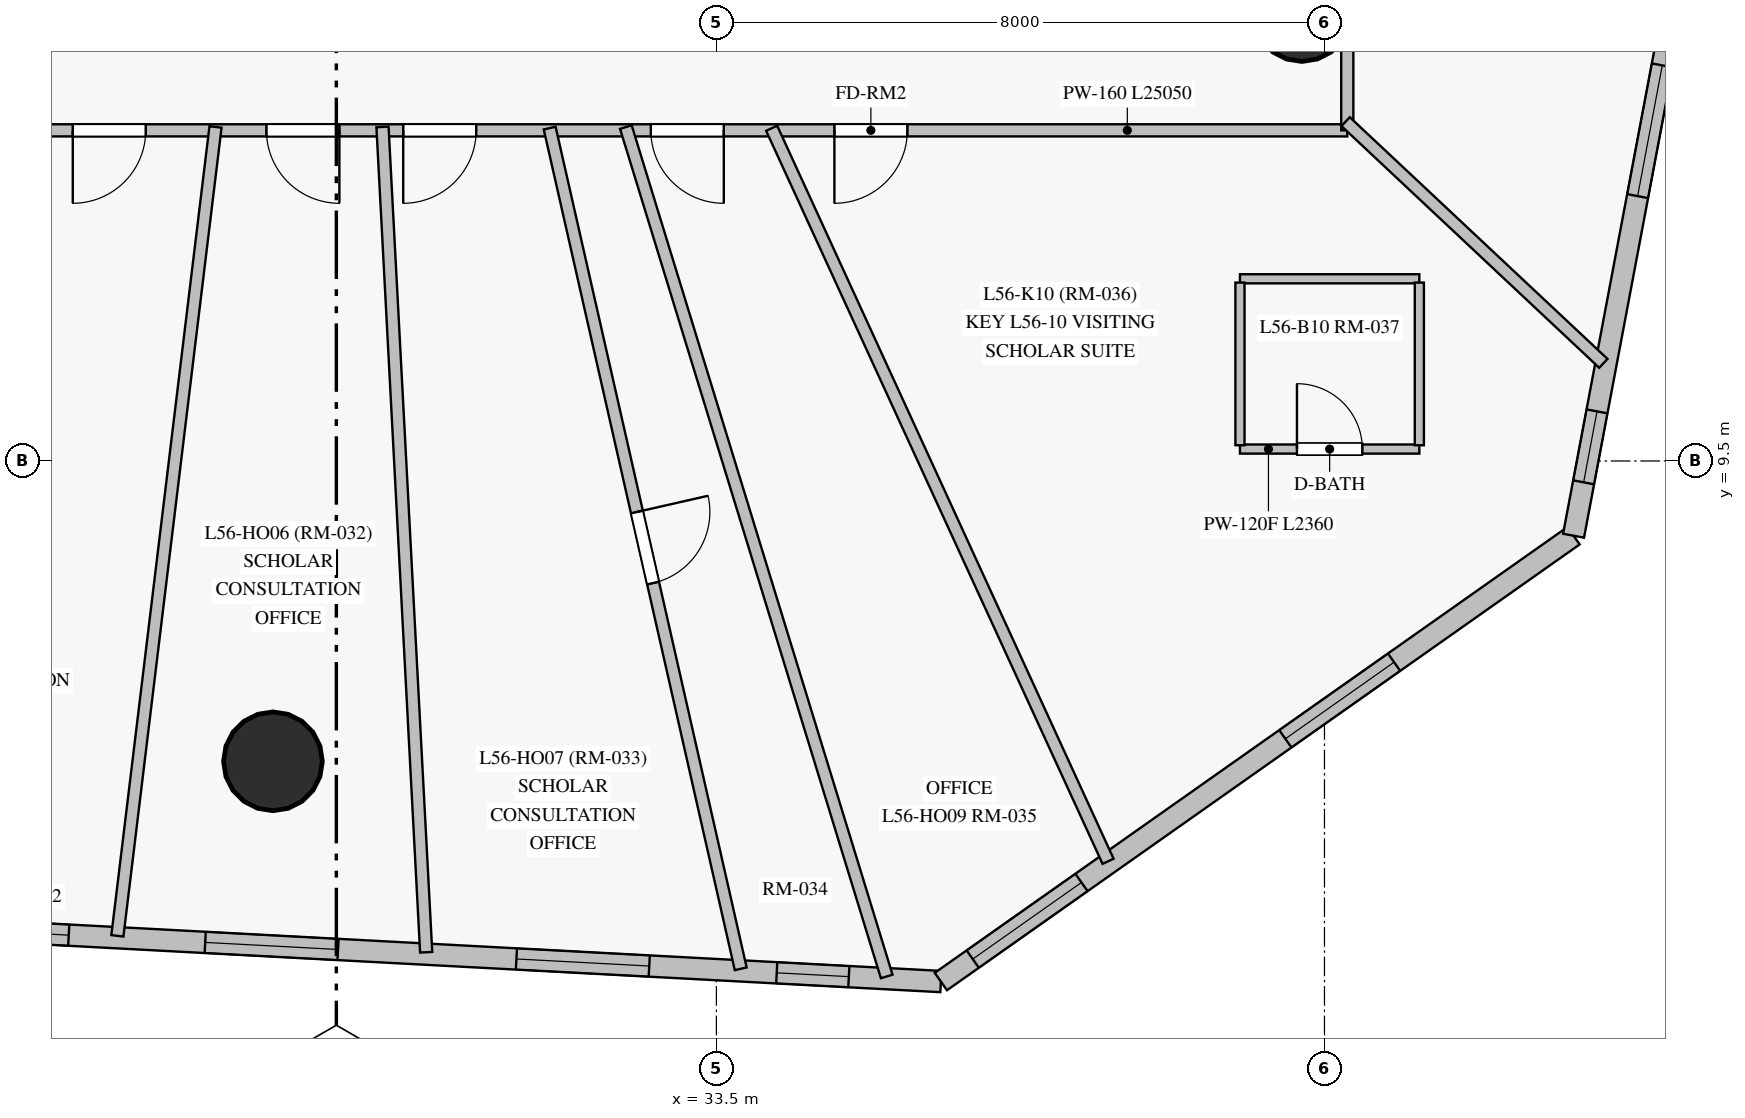
"""IFC4 building model, lengths in metres.
Left out: names, types, materials, properties, quantities, classifications, styles, units other than length and angle.
Written with IfcOpenShell. Run it as: python <this file> out.ifc"""

import sys

from ifc_helpers import new_model, si_unit, direction, frame, frame_2d, origin, origin_with_axes, origin_2d, place, context, subcontext, project, spatial, rectangle, circle, extrude, source, transform, mapped, element, fill, save


model = new_model("IFC4")
c1 = context("Model", 3, precision=1e-05, world=origin(), true_north=direction((0.0, 1.0)))
c2 = subcontext(c1, "Body", "Model", "MODEL_VIEW")
j1 = project(units=[si_unit("LENGTHUNIT", "METRE"), si_unit("PLANEANGLEUNIT", "RADIAN")], contexts=[c1])
p1 = place(None, origin())
s1 = spatial("IfcSite", under=j1, at=p1, CompositionType="ELEMENT")
p2 = place(p1, origin())
s2 = spatial("IfcBuilding", under=s1, at=p2, CompositionType="ELEMENT")
p3 = place(p2, frame((0.0, 0.0, 193.15)))
s3 = spatial("IfcBuildingStorey", under=s2, at=p3, CompositionType="ELEMENT", Elevation=193.15)
m1 = source(origin_with_axes(), c2, "Body", "SweptSolid", [
    extrude(circle(Radius=0.65, at=origin_2d()), origin(), (0.0, 0.0, 1.0), 3.05),
])
for number, where, z_axis, x_axis in (
    (1, (27.666, 5.549, 0.0), (0.0, 0.0, 1.0), (1.0, 0.0, 0.0)),
    (2, (41.204, 15.406, 0.0), (0.0, 0.0, 1.0), (1.0, 0.0, 0.0)),
):
    element("IfcColumn", number, at=place(p3, frame(where, z_axis=z_axis, x_axis=x_axis)), inside=s3, PredefinedType="COLUMN", context=c2, shape_type="MappedRepresentation", body=[
        mapped(m1, transform((0.0, 0.0, 0.0), scale=1.0)),
    ])
p4 = place(p3, frame((23.33, 3.35, 0.0), z_axis=(0.0, 0.0, 1.0), x_axis=(0.998588579162, -0.053111670719, 0.0)))
e3 = element("IfcWall", 3, at=p4, inside=s3, PredefinedType="SOLIDWALL", context=c2, shape_type="SweptSolid", body=[
    extrude(rectangle(XDim=13.142, YDim=0.28, at=frame_2d((6.571, 0.0))), origin(), (0.0, 0.0, 1.0), 2.825),
])
p5 = place(p4, frame((0.702, 0.0, 0.85)))
e4 = element("IfcOpeningElement", 4, at=p5, cuts=e3, PredefinedType="OPENING", context=c2, shape_type="SweptSolid", body=[
    extrude(rectangle(XDim=0.95, YDim=1.5, at=frame_2d((0.475, 0.75))), frame((0.0, 0.15, 0.0), z_axis=(0.0, -1.0, 0.0), x_axis=(1.0, 0.0, 0.0)), (0.0, 0.0, 1.0), 0.3),
])
p6 = place(p4, frame((3.45, 0.0, 0.85)))
e5 = element("IfcOpeningElement", 5, at=p6, cuts=e3, PredefinedType="OPENING", context=c2, shape_type="SweptSolid", body=[
    extrude(rectangle(XDim=1.75, YDim=1.65, at=frame_2d((0.875, 0.825))), frame((0.0, 0.15, 0.0), z_axis=(0.0, -1.0, 0.0), x_axis=(1.0, 0.0, 0.0)), (0.0, 0.0, 1.0), 0.3),
])
p7 = place(p4, frame((7.55, 0.0, 0.85)))
e6 = element("IfcOpeningElement", 6, at=p7, cuts=e3, PredefinedType="OPENING", context=c2, shape_type="SweptSolid", body=[
    extrude(rectangle(XDim=1.75, YDim=1.65, at=frame_2d((0.875, 0.825))), frame((0.0, 0.15, 0.0), z_axis=(0.0, -1.0, 0.0), x_axis=(1.0, 0.0, 0.0)), (0.0, 0.0, 1.0), 0.3),
])
p8 = place(p4, frame((10.979, 0.0, 0.85)))
e7 = element("IfcOpeningElement", 7, at=p8, cuts=e3, PredefinedType="OPENING", context=c2, shape_type="SweptSolid", body=[
    extrude(rectangle(XDim=0.95, YDim=1.5, at=frame_2d((0.475, 0.75))), frame((0.0, 0.15, 0.0), z_axis=(0.0, -1.0, 0.0), x_axis=(1.0, 0.0, 0.0)), (0.0, 0.0, 1.0), 0.3),
])
p9 = place(p3, frame((36.453, 2.652, 0.0), z_axis=(0.0, 0.0, 1.0), x_axis=(0.817449334026, 0.576000508941, 0.0)))
e8 = element("IfcWall", 8, at=p9, inside=s3, PredefinedType="SOLIDWALL", context=c2, shape_type="SweptSolid", body=[
    extrude(rectangle(XDim=10.182, YDim=0.28, at=frame_2d((5.091, 0.0))), origin(), (0.0, 0.0, 1.0), 2.825),
])
p10 = place(p9, frame((0.513, 0.0, 0.85)))
e9 = element("IfcOpeningElement", 9, at=p10, cuts=e8, PredefinedType="OPENING", context=c2, shape_type="SweptSolid", body=[
    extrude(rectangle(XDim=1.75, YDim=1.65, at=frame_2d((0.875, 0.825))), frame((0.0, 0.15, 0.0), z_axis=(0.0, -1.0, 0.0), x_axis=(1.0, 0.0, 0.0)), (0.0, 0.0, 1.0), 0.3),
])
p11 = place(p9, frame((5.544, 0.0, 0.85)))
e10 = element("IfcOpeningElement", 10, at=p11, cuts=e8, PredefinedType="OPENING", context=c2, shape_type="SweptSolid", body=[
    extrude(rectangle(XDim=1.75, YDim=1.65, at=frame_2d((0.875, 0.825))), frame((0.0, 0.15, 0.0), z_axis=(0.0, -1.0, 0.0), x_axis=(1.0, 0.0, 0.0)), (0.0, 0.0, 1.0), 0.3),
])
p12 = place(p3, frame((44.777, 8.517, 0.0), z_axis=(0.0, 0.0, 1.0), x_axis=(0.185389024618, 0.982665207256, 0.0)))
e11 = element("IfcWall", 11, at=p12, inside=s3, PredefinedType="SOLIDWALL", context=c2, shape_type="SweptSolid", body=[
    extrude(rectangle(XDim=14.17, YDim=0.28, at=frame_2d((7.085, 0.0))), origin(), (0.0, 0.0, 1.0), 2.825),
])
p13 = place(p12, frame((0.715, 0.0, 0.85)))
e12 = element("IfcOpeningElement", 12, at=p13, cuts=e11, PredefinedType="OPENING", context=c2, shape_type="SweptSolid", body=[
    extrude(rectangle(XDim=0.95, YDim=1.5, at=frame_2d((0.475, 0.75))), frame((0.0, 0.15, 0.0), z_axis=(0.0, -1.0, 0.0), x_axis=(1.0, 0.0, 0.0)), (0.0, 0.0, 1.0), 0.3),
])
p14 = place(p12, frame((4.547, 0.0, 0.85)))
e13 = element("IfcOpeningElement", 13, at=p14, cuts=e11, PredefinedType="OPENING", context=c2, shape_type="SweptSolid", body=[
    extrude(rectangle(XDim=1.75, YDim=1.65, at=frame_2d((0.875, 0.825))), frame((0.0, 0.15, 0.0), z_axis=(0.0, -1.0, 0.0), x_axis=(1.0, 0.0, 0.0)), (0.0, 0.0, 1.0), 0.3),
])
p15 = place(p12, frame((10.442, 0.0, 0.85)))
e14 = element("IfcOpeningElement", 14, at=p15, cuts=e11, PredefinedType="OPENING", context=c2, shape_type="SweptSolid", body=[
    extrude(rectangle(XDim=1.75, YDim=1.65, at=frame_2d((0.875, 0.825))), frame((0.0, 0.15, 0.0), z_axis=(0.0, -1.0, 0.0), x_axis=(1.0, 0.0, 0.0)), (0.0, 0.0, 1.0), 0.3),
])
p16 = place(p3, frame((41.8, 13.85, 0.0), z_axis=(0.0, 0.0, 1.0), x_axis=(-1.0, 0.0, 0.0)))
e15 = element("IfcWall", 15, at=p16, inside=s3, PredefinedType="PARTITIONING", context=c2, shape_type="SweptSolid", body=[
    extrude(rectangle(XDim=25.05, YDim=0.16, at=frame_2d((12.525, 0.0))), origin(), (0.0, 0.0, 1.0), 2.275),
])
p17 = place(p16, frame((5.788, 0.0, 0.0)))
e16 = element("IfcOpeningElement", 16, at=p17, cuts=e15, PredefinedType="OPENING", context=c2, shape_type="SweptSolid", body=[
    extrude(rectangle(XDim=0.96, YDim=2.15, at=frame_2d((0.48, 1.075))), frame((0.0, 0.09, 0.0), z_axis=(0.0, -1.0, 0.0), x_axis=(1.0, 0.0, 0.0)), (0.0, 0.0, 1.0), 0.18),
])
p18 = place(p16, frame((18.802, 0.0, 0.0)))
e17 = element("IfcOpeningElement", 17, at=p18, cuts=e15, PredefinedType="OPENING", context=c2, shape_type="SweptSolid", body=[
    extrude(rectangle(XDim=0.96, YDim=2.15, at=frame_2d((0.48, 1.075))), frame((0.0, 0.09, 0.0), z_axis=(0.0, -1.0, 0.0), x_axis=(1.0, 0.0, 0.0)), (0.0, 0.0, 1.0), 0.18),
])
p19 = place(p16, frame((15.808, 0.0, 0.0)))
e18 = element("IfcOpeningElement", 18, at=p19, cuts=e15, PredefinedType="OPENING", context=c2, shape_type="SweptSolid", body=[
    extrude(rectangle(XDim=0.96, YDim=2.15, at=frame_2d((0.48, 1.075))), frame((0.0, 0.09, 0.0), z_axis=(0.0, -1.0, 0.0), x_axis=(1.0, 0.0, 0.0)), (0.0, 0.0, 1.0), 0.18),
])
p20 = place(p16, frame((13.26, 0.0, 0.0)))
e19 = element("IfcOpeningElement", 19, at=p20, cuts=e15, PredefinedType="OPENING", context=c2, shape_type="SweptSolid", body=[
    extrude(rectangle(XDim=0.96, YDim=2.15, at=frame_2d((0.48, 1.075))), frame((0.0, 0.09, 0.0), z_axis=(0.0, -1.0, 0.0), x_axis=(1.0, 0.0, 0.0)), (0.0, 0.0, 1.0), 0.18),
])
p21 = place(p16, frame((11.46, 0.0, 0.0)))
e20 = element("IfcOpeningElement", 20, at=p21, cuts=e15, PredefinedType="OPENING", context=c2, shape_type="SweptSolid", body=[
    extrude(rectangle(XDim=0.96, YDim=2.15, at=frame_2d((0.48, 1.075))), frame((0.0, 0.09, 0.0), z_axis=(0.0, -1.0, 0.0), x_axis=(1.0, 0.0, 0.0)), (0.0, 0.0, 1.0), 0.18),
])
p22 = place(p16, frame((8.202, 0.0, 0.0)))
e21 = element("IfcOpeningElement", 21, at=p22, cuts=e15, PredefinedType="OPENING", context=c2, shape_type="SweptSolid", body=[
    extrude(rectangle(XDim=0.96, YDim=2.15, at=frame_2d((0.48, 1.075))), frame((0.0, 0.09, 0.0), z_axis=(0.0, -1.0, 0.0), x_axis=(1.0, 0.0, 0.0)), (0.0, 0.0, 1.0), 0.18),
])
p23 = place(p3, frame((41.8, 33.45, 0.0), z_axis=(0.0, 0.0, 1.0), x_axis=(0.0, -1.0, 0.0)))
e22 = element("IfcWall", 22, at=p23, inside=s3, PredefinedType="PARTITIONING", context=c2, shape_type="SweptSolid", body=[
    extrude(rectangle(XDim=19.6, YDim=0.16, at=frame_2d((9.8, 0.0))), origin(), (0.0, 0.0, 1.0), 2.275),
])
p24 = place(p23, frame((14.715, 0.0, 0.0)))
e23 = element("IfcOpeningElement", 23, at=p24, cuts=e22, PredefinedType="OPENING", context=c2, shape_type="SweptSolid", body=[
    extrude(rectangle(XDim=0.96, YDim=2.15, at=frame_2d((0.48, 1.075))), frame((0.0, 0.09, 0.0), z_axis=(0.0, -1.0, 0.0), x_axis=(1.0, 0.0, 0.0)), (0.0, 0.0, 1.0), 0.18),
])
p25 = place(p23, frame((9.325, 0.0, 0.0)))
e24 = element("IfcOpeningElement", 24, at=p25, cuts=e22, PredefinedType="OPENING", context=c2, shape_type="SweptSolid", body=[
    extrude(rectangle(XDim=0.96, YDim=2.15, at=frame_2d((0.48, 1.075))), frame((0.0, 0.09, 0.0), z_axis=(0.0, -1.0, 0.0), x_axis=(1.0, 0.0, 0.0)), (0.0, 0.0, 1.0), 0.18),
])
p26 = place(p23, frame((4.425, 0.0, 0.0)))
e25 = element("IfcOpeningElement", 25, at=p26, cuts=e22, PredefinedType="OPENING", context=c2, shape_type="SweptSolid", body=[
    extrude(rectangle(XDim=0.96, YDim=2.15, at=frame_2d((0.48, 1.075))), frame((0.0, 0.09, 0.0), z_axis=(0.0, -1.0, 0.0), x_axis=(1.0, 0.0, 0.0)), (0.0, 0.0, 1.0), 0.18),
])
p27 = place(p3, frame((32.309, 13.893, 0.0), z_axis=(0.0, 0.0, 1.0), x_axis=(0.293563334505, -0.95593962604, 0.0)))
e26 = element("IfcWall", 26, at=p27, inside=s3, PredefinedType="PARTITIONING", context=c2, shape_type="SweptSolid", body=[
    extrude(rectangle(XDim=11.69, YDim=0.16, at=frame_2d((5.845, 0.0))), origin(), (0.0, 0.0, 1.0), 2.825),
])
p28 = place(p3, frame((31.307, 13.879, 0.0), z_axis=(0.0, 0.0, 1.0), x_axis=(0.221597844898, -0.975138141566, 0.0)))
e27 = element("IfcWall", 27, at=p28, inside=s3, PredefinedType="PARTITIONING", context=c2, shape_type="SweptSolid", body=[
    extrude(rectangle(XDim=11.342, YDim=0.16, at=frame_2d((5.671, 0.0))), origin(), (0.0, 0.0, 1.0), 2.825),
])
p29 = place(p28, frame((5.179, 0.0, 0.0)))
e28 = element("IfcOpeningElement", 28, at=p29, cuts=e27, PredefinedType="OPENING", context=c2, shape_type="SweptSolid", body=[
    extrude(rectangle(XDim=0.96, YDim=2.15, at=frame_2d((0.48, 1.075))), frame((0.0, 0.09, 0.0), z_axis=(0.0, -1.0, 0.0), x_axis=(1.0, 0.0, 0.0)), (0.0, 0.0, 1.0), 0.18),
])
p30 = place(p3, frame((29.107, 13.895, 0.0), z_axis=(0.0, 0.0, 1.0), x_axis=(0.052855813996, -0.998602154477, 0.0)))
e29 = element("IfcWall", 29, at=p30, inside=s3, PredefinedType="PARTITIONING", context=c2, shape_type="SweptSolid", body=[
    extrude(rectangle(XDim=10.873, YDim=0.16, at=frame_2d((5.437, 0.0))), origin(), (0.0, 0.0, 1.0), 2.825),
])
p31 = place(p3, frame((26.91, 13.895, 0.0), z_axis=(0.0, 0.0, 1.0), x_axis=(-0.120454472702, -0.992718852448, 0.0)))
e30 = element("IfcWall", 30, at=p31, inside=s3, PredefinedType="PARTITIONING", context=c2, shape_type="SweptSolid", body=[
    extrude(rectangle(XDim=10.72, YDim=0.16, at=frame_2d((5.36, 0.0))), origin(), (0.0, 0.0, 1.0), 2.275),
])
p32 = place(p3, frame((34.227, 13.877, 0.0), z_axis=(0.0, 0.0, 1.0), x_axis=(0.417118124117, -0.90885228202, 0.0)))
e31 = element("IfcWall", 31, at=p32, inside=s3, PredefinedType="PARTITIONING", context=c2, shape_type="SweptSolid", body=[
    extrude(rectangle(XDim=10.611, YDim=0.16, at=frame_2d((5.306, 0.0))), origin(), (0.0, 0.0, 1.0), 2.825),
])
p33 = place(p3, frame((41.778, 13.965, 0.0), z_axis=(0.0, 0.0, 1.0), x_axis=(0.729404533872, -0.684082616331, 0.0)))
e32 = element("IfcWall", 32, at=p33, inside=s3, PredefinedType="PARTITIONING", context=c2, shape_type="SweptSolid", body=[
    extrude(rectangle(XDim=4.649, YDim=0.16, at=frame_2d((2.324, 0.0))), origin(), (0.0, 0.0, 1.0), 2.825),
])
p34 = place(p3, frame((40.388, 9.657, 0.0), z_axis=(0.0, 0.0, 1.0), x_axis=(1.0, 0.0, 0.0)))
e33 = element("IfcWall", 33, at=p34, inside=s3, PredefinedType="PARTITIONING", context=c2, shape_type="SweptSolid", body=[
    extrude(rectangle(XDim=2.36, YDim=0.12, at=frame_2d((1.18, 0.0))), origin(), (0.0, 0.0, 1.0), 2.825),
])
p35 = place(p34, frame((0.75, 0.0, 0.0)))
e34 = element("IfcOpeningElement", 34, at=p35, cuts=e33, PredefinedType="OPENING", context=c2, shape_type="SweptSolid", body=[
    extrude(rectangle(XDim=0.86, YDim=2.1, at=frame_2d((0.43, 1.05))), frame((0.0, 0.07, 0.0), z_axis=(0.0, -1.0, 0.0), x_axis=(1.0, 0.0, 0.0)), (0.0, 0.0, 1.0), 0.14),
])
p36 = place(p3, frame((42.748, 11.897, 0.0), z_axis=(0.0, 0.0, 1.0), x_axis=(-1.0, 0.0, 0.0)))
e35 = element("IfcWall", 35, at=p36, inside=s3, PredefinedType="PARTITIONING", context=c2, shape_type="SweptSolid", body=[
    extrude(rectangle(XDim=2.36, YDim=0.12, at=frame_2d((1.18, 0.0))), origin(), (0.0, 0.0, 1.0), 2.825),
])
for number, where, z_axis, x_axis in (
    (36, (42.748, 9.707, 0.0), (0.0, 0.0, 1.0), (0.0, 1.0, 0.0)),
    (37, (40.388, 11.847, 0.0), (0.0, 0.0, 1.0), (0.0, -1.0, 0.0)),
):
    element("IfcWall", number, at=place(p3, frame(where, z_axis=z_axis, x_axis=x_axis)), inside=s3, PredefinedType="PARTITIONING", context=c2, shape_type="SweptSolid", body=[
        extrude(rectangle(XDim=2.14, YDim=0.12, at=frame_2d((1.07, 0.0))), origin(), (0.0, 0.0, 1.0), 2.825),
    ])
m2 = source(origin_with_axes(), c2, "Body", "SweptSolid", [
    extrude(rectangle(XDim=0.95, YDim=1.5, at=frame_2d((0.475, 0.75))), frame((0.0, 0.03, 0.0), z_axis=(0.0, -1.0, 0.0), x_axis=(1.0, 0.0, 0.0)), (0.0, 0.0, 1.0), 0.06),
])
p37 = place(p5, origin())
e38 = element("IfcWindow", 38, at=p37, inside=s3, PartitioningType="SINGLE_PANEL", PredefinedType="WINDOW", context=c2, shape_type="MappedRepresentation", body=[
    mapped(m2, transform((0.0, 0.0, 0.0), scale=1.0)),
])
fill(e4, e38)
m3 = source(origin_with_axes(), c2, "Body", "SweptSolid", [
    extrude(rectangle(XDim=1.75, YDim=1.65, at=frame_2d((0.875, 0.825))), frame((0.0, 0.03, 0.0), z_axis=(0.0, -1.0, 0.0), x_axis=(1.0, 0.0, 0.0)), (0.0, 0.0, 1.0), 0.06),
])
p38 = place(p6, origin())
e39 = element("IfcWindow", 39, at=p38, inside=s3, PartitioningType="SINGLE_PANEL", PredefinedType="WINDOW", context=c2, shape_type="MappedRepresentation", body=[
    mapped(m3, transform((0.0, 0.0, 0.0), scale=1.0)),
])
fill(e5, e39)
p39 = place(p7, origin())
e40 = element("IfcWindow", 40, at=p39, inside=s3, PartitioningType="SINGLE_PANEL", PredefinedType="WINDOW", context=c2, shape_type="MappedRepresentation", body=[
    mapped(m3, transform((0.0, 0.0, 0.0), scale=1.0)),
])
fill(e6, e40)
p40 = place(p8, origin())
e41 = element("IfcWindow", 41, at=p40, inside=s3, PartitioningType="SINGLE_PANEL", PredefinedType="WINDOW", context=c2, shape_type="MappedRepresentation", body=[
    mapped(m2, transform((0.0, 0.0, 0.0), scale=1.0)),
])
fill(e7, e41)
p41 = place(p10, origin())
e42 = element("IfcWindow", 42, at=p41, inside=s3, PartitioningType="SINGLE_PANEL", PredefinedType="WINDOW", context=c2, shape_type="MappedRepresentation", body=[
    mapped(m3, transform((0.0, 0.0, 0.0), scale=1.0)),
])
fill(e9, e42)
p42 = place(p11, origin())
e43 = element("IfcWindow", 43, at=p42, inside=s3, PartitioningType="SINGLE_PANEL", PredefinedType="WINDOW", context=c2, shape_type="MappedRepresentation", body=[
    mapped(m3, transform((0.0, 0.0, 0.0), scale=1.0)),
])
fill(e10, e43)
p43 = place(p13, origin())
e44 = element("IfcWindow", 44, at=p43, inside=s3, PartitioningType="SINGLE_PANEL", PredefinedType="WINDOW", context=c2, shape_type="MappedRepresentation", body=[
    mapped(m2, transform((0.0, 0.0, 0.0), scale=1.0)),
])
fill(e12, e44)
p44 = place(p14, origin())
e45 = element("IfcWindow", 45, at=p44, inside=s3, PartitioningType="SINGLE_PANEL", PredefinedType="WINDOW", context=c2, shape_type="MappedRepresentation", body=[
    mapped(m3, transform((0.0, 0.0, 0.0), scale=1.0)),
])
fill(e13, e45)
m4 = source(origin_with_axes(), c2, "Body", "SweptSolid", [
    extrude(rectangle(XDim=0.86, YDim=2.1, at=frame_2d((0.43, 1.05))), frame((0.0, 0.025, 0.0), z_axis=(0.0, -1.0, 0.0), x_axis=(1.0, 0.0, 0.0)), (0.0, 0.0, 1.0), 0.05),
])
p45 = place(p35, origin())
e46 = element("IfcDoor", 46, at=p45, inside=s3, OperationType="SINGLE_SWING_LEFT", PredefinedType="DOOR", context=c2, shape_type="MappedRepresentation", body=[
    mapped(m4, transform((0.0, 0.0, 0.0), scale=1.0)),
])
fill(e34, e46)
m5 = source(origin_with_axes(), c2, "Body", "SweptSolid", [
    extrude(rectangle(XDim=0.96, YDim=2.15, at=frame_2d((0.48, 1.075))), frame((0.0, 0.025, 0.0), z_axis=(0.0, -1.0, 0.0), x_axis=(1.0, 0.0, 0.0)), (0.0, 0.0, 1.0), 0.05),
])
p46 = place(p17, origin())
e47 = element("IfcDoor", 47, at=p46, inside=s3, OperationType="SINGLE_SWING_RIGHT", PredefinedType="DOOR", context=c2, shape_type="MappedRepresentation", body=[
    mapped(m5, transform((0.0, 0.0, 0.0), scale=1.0)),
])
fill(e16, e47)
p47 = place(p19, origin())
e48 = element("IfcDoor", 48, at=p47, inside=s3, OperationType="SINGLE_SWING_RIGHT", PredefinedType="DOOR", context=c2, shape_type="MappedRepresentation", body=[
    mapped(m5, transform((0.0, 0.0, 0.0), scale=1.0)),
])
fill(e18, e48)
p48 = place(p20, origin())
e49 = element("IfcDoor", 49, at=p48, inside=s3, OperationType="SINGLE_SWING_LEFT", PredefinedType="DOOR", context=c2, shape_type="MappedRepresentation", body=[
    mapped(m5, transform((0.0, 0.0, 0.0), scale=1.0)),
])
fill(e19, e49)
p49 = place(p21, origin())
e50 = element("IfcDoor", 50, at=p49, inside=s3, OperationType="SINGLE_SWING_RIGHT", PredefinedType="DOOR", context=c2, shape_type="MappedRepresentation", body=[
    mapped(m5, transform((0.0, 0.0, 0.0), scale=1.0)),
])
fill(e20, e50)
p50 = place(p22, origin())
e51 = element("IfcDoor", 51, at=p50, inside=s3, OperationType="SINGLE_SWING_LEFT", PredefinedType="DOOR", context=c2, shape_type="MappedRepresentation", body=[
    mapped(m5, transform((0.0, 0.0, 0.0), scale=1.0)),
])
fill(e21, e51)
p51 = place(p29, origin())
e52 = element("IfcDoor", 52, at=p51, inside=s3, OperationType="SINGLE_SWING_LEFT", PredefinedType="DOOR", context=c2, shape_type="MappedRepresentation", body=[
    mapped(m5, transform((0.0, 0.0, 0.0), scale=1.0)),
])
fill(e28, e52)
save(model, sys.argv[1])
